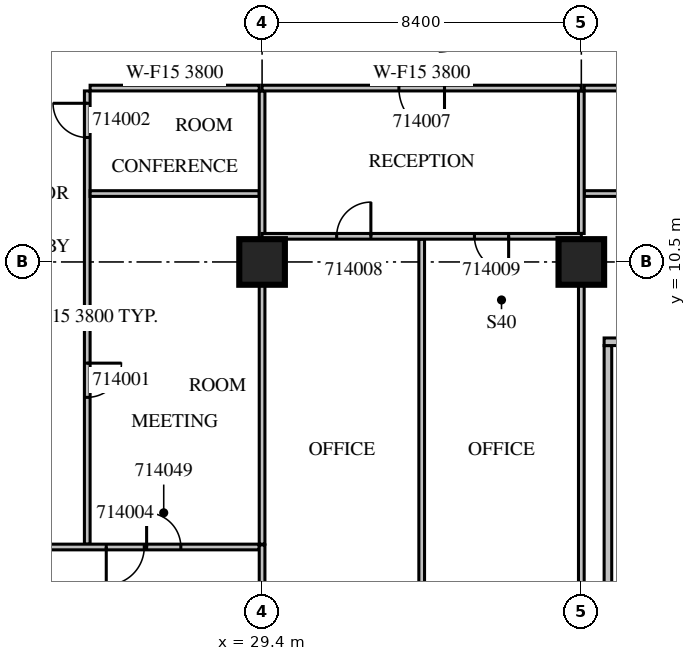
"""IFC4 building model, lengths in metres.
Left out: names, types, materials, properties, quantities, classifications, styles, units other than length and angle.
Written with IfcOpenShell. Run it as: python <this file> out.ifc"""

import sys

from ifc_helpers import new_model, si_unit, direction, frame, frame_2d, origin, origin_2d, place, context, subcontext, project, spatial, rectangle, extrude, source, transform, mapped, element, fill, save


model = new_model("IFC4")
c1 = context("Model", 3, precision=1e-05, world=origin(), true_north=direction((0.0, 1.0)))
c2 = subcontext(c1, "Body", "Model", "MODEL_VIEW")
j1 = project(units=[si_unit("LENGTHUNIT", "METRE"), si_unit("PLANEANGLEUNIT", "RADIAN")], contexts=[c1])
p1 = place(None, origin())
s1 = spatial("IfcSite", under=j1, at=p1, CompositionType="ELEMENT")
p2 = place(p1, origin())
s2 = spatial("IfcBuilding", under=s1, at=p2, CompositionType="ELEMENT")
p3 = place(p2, frame((0.0, 0.0, 69.9)))
s3 = spatial("IfcBuildingStorey", under=s2, at=p3, CompositionType="ELEMENT", Elevation=69.9)
m1 = source(origin(), c2, "Body", "SweptSolid", [
    extrude(rectangle(XDim=1.2, YDim=1.2, at=origin_2d()), origin(), (0.0, 0.0, 1.0), 4.2),
])
for number, where, z_axis, x_axis in (
    (1, (29.4, 10.5, 0.0), (0.0, 0.0, 1.0), (1.0, 0.0, 0.0)),
    (2, (37.8, 10.5, 0.0), (0.0, 0.0, 1.0), (1.0, 0.0, 0.0)),
):
    element("IfcColumn", number, at=place(p3, frame(where, z_axis=z_axis, x_axis=x_axis)), inside=s3, PredefinedType="COLUMN", context=c2, shape_type="MappedRepresentation", body=[
        mapped(m1, transform((0.0, 0.0, 0.0), scale=1.0)),
    ])
m2 = source(origin(), c2, "Body", "SweptSolid", [
    extrude(rectangle(XDim=8.0, YDim=0.2, at=frame_2d((4.0, 0.0))), origin(), (0.0, 0.0, 1.0), 3.8),
])
p4 = place(p3, frame((38.5, 0.3, 0.0), z_axis=(0.0, 0.0, 1.0), x_axis=(0.0, 1.0, 0.0)))
e3 = element("IfcWall", 3, at=p4, inside=s3, PredefinedType="PARTITIONING", context=c2, shape_type="MappedRepresentation", body=[
    mapped(m2, transform((0.0, 0.0, 0.0), scale=1.0)),
])
m3 = source(origin(), c2, "Body", "SweptSolid", [
    extrude(rectangle(XDim=5.45, YDim=0.2, at=frame_2d((2.725, 0.0))), origin(), (0.0, 0.0, 1.0), 3.8),
])
p5 = place(p3, frame((38.4, 8.4, 0.0), z_axis=(0.0, 0.0, 1.0), x_axis=(1.0, 0.0, 0.0)))
e4 = element("IfcWall", 4, at=p5, inside=s3, PredefinedType="PARTITIONING", context=c2, shape_type="MappedRepresentation", body=[
    mapped(m3, transform((0.0, 0.0, 0.0), scale=1.0)),
])
m4 = source(origin(), c2, "Body", "SweptSolid", [
    extrude(rectangle(XDim=1.2, YDim=2.1, at=frame_2d((0.6, 1.05))), frame((0.0, 0.11, 0.0), z_axis=(0.0, -1.0, 0.0), x_axis=(1.0, 0.0, 0.0)), (0.0, 0.0, 1.0), 0.22),
])
p6 = place(p5, frame((0.4, 0.0, 0.0)))
e5 = element("IfcOpeningElement", 5, at=p6, cuts=e4, PredefinedType="OPENING", context=c2, shape_type="MappedRepresentation", body=[
    mapped(m4, transform((0.0, 0.0, 0.0), scale=1.0)),
])
m5 = source(origin(), c2, "Body", "SweptSolid", [
    extrude(rectangle(XDim=0.9, YDim=2.1, at=frame_2d((0.45, 1.05))), frame((0.0, 0.11, 0.0), z_axis=(0.0, -1.0, 0.0), x_axis=(1.0, 0.0, 0.0)), (0.0, 0.0, 1.0), 0.22),
])
p7 = place(p5, frame((3.25, 0.0, 0.0)))
e6 = element("IfcOpeningElement", 6, at=p7, cuts=e4, PredefinedType="OPENING", context=c2, shape_type="MappedRepresentation", body=[
    mapped(m5, transform((0.0, 0.0, 0.0), scale=1.0)),
])
m6 = source(origin(), c2, "Body", "SweptSolid", [
    extrude(rectangle(XDim=11.925, YDim=0.15, at=frame_2d((5.963, 0.0))), origin(), (0.0, 0.0, 1.0), 3.8),
])
p8 = place(p3, frame((24.8, 15.0, 0.0), z_axis=(0.0, 0.0, 1.0), x_axis=(0.0, -1.0, 0.0)))
e7 = element("IfcWall", 7, at=p8, inside=s3, PredefinedType="PARTITIONING", context=c2, shape_type="MappedRepresentation", body=[
    mapped(m6, transform((0.0, 0.0, 0.0), scale=1.0)),
])
m7 = source(origin(), c2, "Body", "SweptSolid", [
    extrude(rectangle(XDim=0.9, YDim=2.1, at=frame_2d((0.45, 1.05))), frame((0.0, 0.085, 0.0), z_axis=(0.0, -1.0, 0.0), x_axis=(1.0, 0.0, 0.0)), (0.0, 0.0, 1.0), 0.17),
])
p9 = place(p8, frame((7.162, 0.0, 0.0)))
e8 = element("IfcOpeningElement", 8, at=p9, cuts=e7, PredefinedType="OPENING", context=c2, shape_type="MappedRepresentation", body=[
    mapped(m7, transform((0.0, 0.0, 0.0), scale=1.0)),
])
p10 = place(p8, frame((0.325, 0.0, 0.0)))
e9 = element("IfcOpeningElement", 9, at=p10, cuts=e7, PredefinedType="OPENING", context=c2, shape_type="MappedRepresentation", body=[
    mapped(m7, transform((0.0, 0.0, 0.0), scale=1.0)),
])
m8 = source(origin(), c2, "Body", "SweptSolid", [
    extrude(rectangle(XDim=4.45, YDim=0.15, at=frame_2d((2.225, 0.0))), origin(), (0.0, 0.0, 1.0), 3.8),
])
for number, where, z_axis, x_axis in (
    (10, (29.325, 12.3, 0.0), (0.0, 0.0, 1.0), (-1.0, 0.0, 0.0)),
    (11, (29.325, 15.075, 0.0), (0.0, 0.0, 1.0), (-1.0, 0.0, 0.0)),
):
    element("IfcWall", number, at=place(p3, frame(where, z_axis=z_axis, x_axis=x_axis)), inside=s3, PredefinedType="PARTITIONING", context=c2, shape_type="MappedRepresentation", body=[
        mapped(m8, transform((0.0, 0.0, 0.0), scale=1.0)),
    ])
m9 = source(origin(), c2, "Body", "SweptSolid", [
    extrude(rectangle(XDim=6.826, YDim=0.15, at=frame_2d((3.413, 0.0))), origin(), (0.0, 0.0, 1.0), 3.8),
])
p11 = place(p3, frame((29.4, 3.075, 0.0), z_axis=(0.0, 0.0, 1.0), x_axis=(0.0, 1.0, 0.0)))
e12 = element("IfcWall", 12, at=p11, inside=s3, PredefinedType="PARTITIONING", context=c2, shape_type="MappedRepresentation", body=[
    mapped(m9, transform((0.0, 0.0, 0.0), scale=1.0)),
])
m10 = source(origin(), c2, "Body", "SweptSolid", [
    extrude(rectangle(XDim=3.901, YDim=0.15, at=frame_2d((1.95, 0.0))), origin(), (0.0, 0.0, 1.0), 3.8),
])
p12 = place(p3, frame((29.4, 11.099, 0.0), z_axis=(0.0, 0.0, 1.0), x_axis=(0.0, 1.0, 0.0)))
e13 = element("IfcWall", 13, at=p12, inside=s3, PredefinedType="PARTITIONING", context=c2, shape_type="MappedRepresentation", body=[
    mapped(m10, transform((0.0, 0.0, 0.0), scale=1.0)),
])
m11 = source(origin(), c2, "Body", "SweptSolid", [
    extrude(rectangle(XDim=7.125, YDim=0.15, at=frame_2d((3.562, 0.0))), origin(), (0.0, 0.0, 1.0), 3.8),
])
p13 = place(p3, frame((22.2, 3.0, 0.0), z_axis=(0.0, 0.0, 1.0), x_axis=(1.0, 0.0, 0.0)))
e14 = element("IfcWall", 14, at=p13, inside=s3, PredefinedType="PARTITIONING", context=c2, shape_type="MappedRepresentation", body=[
    mapped(m11, transform((0.0, 0.0, 0.0), scale=1.0)),
])
m12 = source(origin(), c2, "Body", "SweptSolid", [
    extrude(rectangle(XDim=1.0, YDim=2.1, at=frame_2d((0.5, 1.05))), frame((0.0, 0.085, 0.0), z_axis=(0.0, -1.0, 0.0), x_axis=(1.0, 0.0, 0.0)), (0.0, 0.0, 1.0), 0.17),
])
p14 = place(p13, frame((3.1, 0.0, 0.0)))
e15 = element("IfcOpeningElement", 15, at=p14, cuts=e14, PredefinedType="OPENING", context=c2, shape_type="MappedRepresentation", body=[
    mapped(m12, transform((0.0, 0.0, 0.0), scale=1.0)),
])
p15 = place(p13, frame((4.162, 0.0, 0.0)))
e16 = element("IfcOpeningElement", 16, at=p15, cuts=e14, PredefinedType="OPENING", context=c2, shape_type="MappedRepresentation", body=[
    mapped(m7, transform((0.0, 0.0, 0.0), scale=1.0)),
])
m13 = source(origin(), c2, "Body", "SweptSolid", [
    extrude(rectangle(XDim=6.45, YDim=0.15, at=frame_2d((3.225, 0.0))), origin(), (0.0, 0.0, 1.0), 3.8),
])
p16 = place(p3, frame((37.875, 12.3, 0.0), z_axis=(0.0, 0.0, 1.0), x_axis=(1.0, 0.0, 0.0)))
e17 = element("IfcWall", 17, at=p16, inside=s3, PredefinedType="PARTITIONING", context=c2, shape_type="MappedRepresentation", body=[
    mapped(m13, transform((0.0, 0.0, 0.0), scale=1.0)),
])
p17 = place(p3, frame((44.325, 15.075, 0.0), z_axis=(0.0, 0.0, 1.0), x_axis=(-1.0, 0.0, 0.0)))
e18 = element("IfcWall", 18, at=p17, inside=s3, PredefinedType="PARTITIONING", context=c2, shape_type="MappedRepresentation", body=[
    mapped(m13, transform((0.0, 0.0, 0.0), scale=1.0)),
])
p18 = place(p17, frame((2.812, 0.0, 0.0)))
e19 = element("IfcOpeningElement", 19, at=p18, cuts=e18, PredefinedType="OPENING", context=c2, shape_type="MappedRepresentation", body=[
    mapped(m7, transform((0.0, 0.0, 0.0), scale=1.0)),
])
m14 = source(origin(), c2, "Body", "SweptSolid", [
    extrude(rectangle(XDim=10.8, YDim=0.15, at=frame_2d((5.4, 0.0))), origin(), (0.0, 0.0, 1.0), 3.8),
])
p19 = place(p3, frame((33.6, 0.3, 0.0), z_axis=(0.0, 0.0, 1.0), x_axis=(0.0, 1.0, 0.0)))
e20 = element("IfcWall", 20, at=p19, inside=s3, PredefinedType="PARTITIONING", context=c2, shape_type="MappedRepresentation", body=[
    mapped(m14, transform((0.0, 0.0, 0.0), scale=1.0)),
])
m15 = source(origin(), c2, "Body", "SweptSolid", [
    extrude(rectangle(XDim=1.856, YDim=0.15, at=frame_2d((0.928, 0.0))), origin(), (0.0, 0.0, 1.0), 3.8),
])
p20 = place(p3, frame((29.4, 1.199, 0.0), z_axis=(0.0, 0.0, 1.0), x_axis=(0.0, 1.0, 0.0)))
e21 = element("IfcWall", 21, at=p20, inside=s3, PredefinedType="PARTITIONING", context=c2, shape_type="MappedRepresentation", body=[
    mapped(m15, transform((0.0, 0.0, 0.0), scale=1.0)),
])
m16 = source(origin(), c2, "Body", "SweptSolid", [
    extrude(rectangle(XDim=8.702, YDim=0.15, at=frame_2d((4.351, 0.0))), origin(), (0.0, 0.0, 1.0), 3.8),
])
p21 = place(p3, frame((37.8, 1.199, 0.0), z_axis=(0.0, 0.0, 1.0), x_axis=(0.0, 1.0, 0.0)))
e22 = element("IfcWall", 22, at=p21, inside=s3, PredefinedType="PARTITIONING", context=c2, shape_type="MappedRepresentation", body=[
    mapped(m16, transform((0.0, 0.0, 0.0), scale=1.0)),
])
m17 = source(origin(), c2, "Body", "SweptSolid", [
    extrude(rectangle(XDim=3.75, YDim=0.15, at=frame_2d((1.875, 0.0))), origin(), (0.0, 0.0, 1.0), 3.8),
])
p22 = place(p3, frame((37.8, 11.25, 0.0), z_axis=(0.0, 0.0, 1.0), x_axis=(0.0, 1.0, 0.0)))
e23 = element("IfcWall", 23, at=p22, inside=s3, PredefinedType="PARTITIONING", context=c2, shape_type="MappedRepresentation", body=[
    mapped(m17, transform((0.0, 0.0, 0.0), scale=1.0)),
])
m18 = source(origin(), c2, "Body", "SweptSolid", [
    extrude(rectangle(XDim=8.4, YDim=0.15, at=frame_2d((4.2, 0.0))), origin(), (0.0, 0.0, 1.0), 3.8),
])
p23 = place(p3, frame((37.8, 11.175, 0.0), z_axis=(0.0, 0.0, 1.0), x_axis=(-1.0, 0.0, 0.0)))
e24 = element("IfcWall", 24, at=p23, inside=s3, PredefinedType="PARTITIONING", context=c2, shape_type="MappedRepresentation", body=[
    mapped(m18, transform((0.0, 0.0, 0.0), scale=1.0)),
])
p24 = place(p23, frame((5.537, 0.0, 0.0)))
e25 = element("IfcOpeningElement", 25, at=p24, cuts=e24, PredefinedType="OPENING", context=c2, shape_type="MappedRepresentation", body=[
    mapped(m7, transform((0.0, 0.0, 0.0), scale=1.0)),
])
p25 = place(p23, frame((1.913, 0.0, 0.0)))
e26 = element("IfcOpeningElement", 26, at=p25, cuts=e24, PredefinedType="OPENING", context=c2, shape_type="MappedRepresentation", body=[
    mapped(m7, transform((0.0, 0.0, 0.0), scale=1.0)),
])
p26 = place(p3, frame((37.8, 15.075, 0.0), z_axis=(0.0, 0.0, 1.0), x_axis=(-1.0, 0.0, 0.0)))
e27 = element("IfcWall", 27, at=p26, inside=s3, PredefinedType="PARTITIONING", context=c2, shape_type="MappedRepresentation", body=[
    mapped(m18, transform((0.0, 0.0, 0.0), scale=1.0)),
])
m19 = source(origin(), c2, "Body", "SweptSolid", [
    extrude(rectangle(XDim=1.2, YDim=2.1, at=frame_2d((0.6, 1.05))), frame((0.0, 0.085, 0.0), z_axis=(0.0, -1.0, 0.0), x_axis=(1.0, 0.0, 0.0)), (0.0, 0.0, 1.0), 0.17),
])
p27 = place(p26, frame((3.6, 0.0, 0.0)))
e28 = element("IfcOpeningElement", 28, at=p27, cuts=e27, PredefinedType="OPENING", context=c2, shape_type="MappedRepresentation", body=[
    mapped(m19, transform((0.0, 0.0, 0.0), scale=1.0)),
])
m20 = source(origin(), c2, "Body", "SweptSolid", [
    extrude(rectangle(XDim=0.9, YDim=2.1, at=frame_2d((0.45, 1.05))), frame((0.0, 0.025, 0.0), z_axis=(0.0, -1.0, 0.0), x_axis=(1.0, 0.0, 0.0)), (0.0, 0.0, 1.0), 0.05),
])
p28 = place(p9, origin())
e29 = element("IfcDoor", 29, at=p28, inside=s3, OperationType="SINGLE_SWING_LEFT", PredefinedType="DOOR", context=c2, shape_type="MappedRepresentation", body=[
    mapped(m20, transform((0.0, 0.0, 0.0), scale=1.0)),
])
fill(e8, e29)
p29 = place(p10, origin())
e30 = element("IfcDoor", 30, at=p29, inside=s3, OperationType="SINGLE_SWING_RIGHT", PredefinedType="DOOR", context=c2, shape_type="MappedRepresentation", body=[
    mapped(m20, transform((0.0, 0.0, 0.0), scale=1.0)),
])
fill(e9, e30)
m21 = source(origin(), c2, "Body", "SweptSolid", [
    extrude(rectangle(XDim=1.0, YDim=2.1, at=frame_2d((0.5, 1.05))), frame((0.0, 0.025, 0.0), z_axis=(0.0, -1.0, 0.0), x_axis=(1.0, 0.0, 0.0)), (0.0, 0.0, 1.0), 0.05),
])
p30 = place(p14, origin())
e31 = element("IfcDoor", 31, at=p30, inside=s3, OperationType="SINGLE_SWING_RIGHT", PredefinedType="DOOR", context=c2, shape_type="MappedRepresentation", body=[
    mapped(m21, transform((0.0, 0.0, 0.0), scale=1.0)),
])
fill(e15, e31)
m22 = source(origin(), c2, "Body", "SweptSolid", [
    extrude(rectangle(XDim=1.2, YDim=2.1, at=frame_2d((0.6, 1.05))), frame((0.0, 0.025, 0.0), z_axis=(0.0, -1.0, 0.0), x_axis=(1.0, 0.0, 0.0)), (0.0, 0.0, 1.0), 0.05),
])
p31 = place(p27, origin())
e32 = element("IfcDoor", 32, at=p31, inside=s3, OperationType="SINGLE_SWING_LEFT", PredefinedType="DOOR", context=c2, shape_type="MappedRepresentation", body=[
    mapped(m22, transform((0.0, 0.0, 0.0), scale=1.0)),
])
fill(e28, e32)
p32 = place(p24, origin())
e33 = element("IfcDoor", 33, at=p32, inside=s3, OperationType="SINGLE_SWING_RIGHT", PredefinedType="DOOR", context=c2, shape_type="MappedRepresentation", body=[
    mapped(m20, transform((0.0, 0.0, 0.0), scale=1.0)),
])
fill(e25, e33)
p33 = place(p25, origin())
e34 = element("IfcDoor", 34, at=p33, inside=s3, OperationType="SINGLE_SWING_LEFT", PredefinedType="DOOR", context=c2, shape_type="MappedRepresentation", body=[
    mapped(m20, transform((0.0, 0.0, 0.0), scale=1.0)),
])
fill(e26, e34)
p34 = place(p15, origin())
e35 = element("IfcDoor", 35, at=p34, inside=s3, OperationType="SINGLE_SWING_LEFT", PredefinedType="DOOR", context=c2, shape_type="MappedRepresentation", body=[
    mapped(m20, transform((0.0, 0.0, 0.0), scale=1.0)),
])
fill(e16, e35)
save(model, sys.argv[1])
